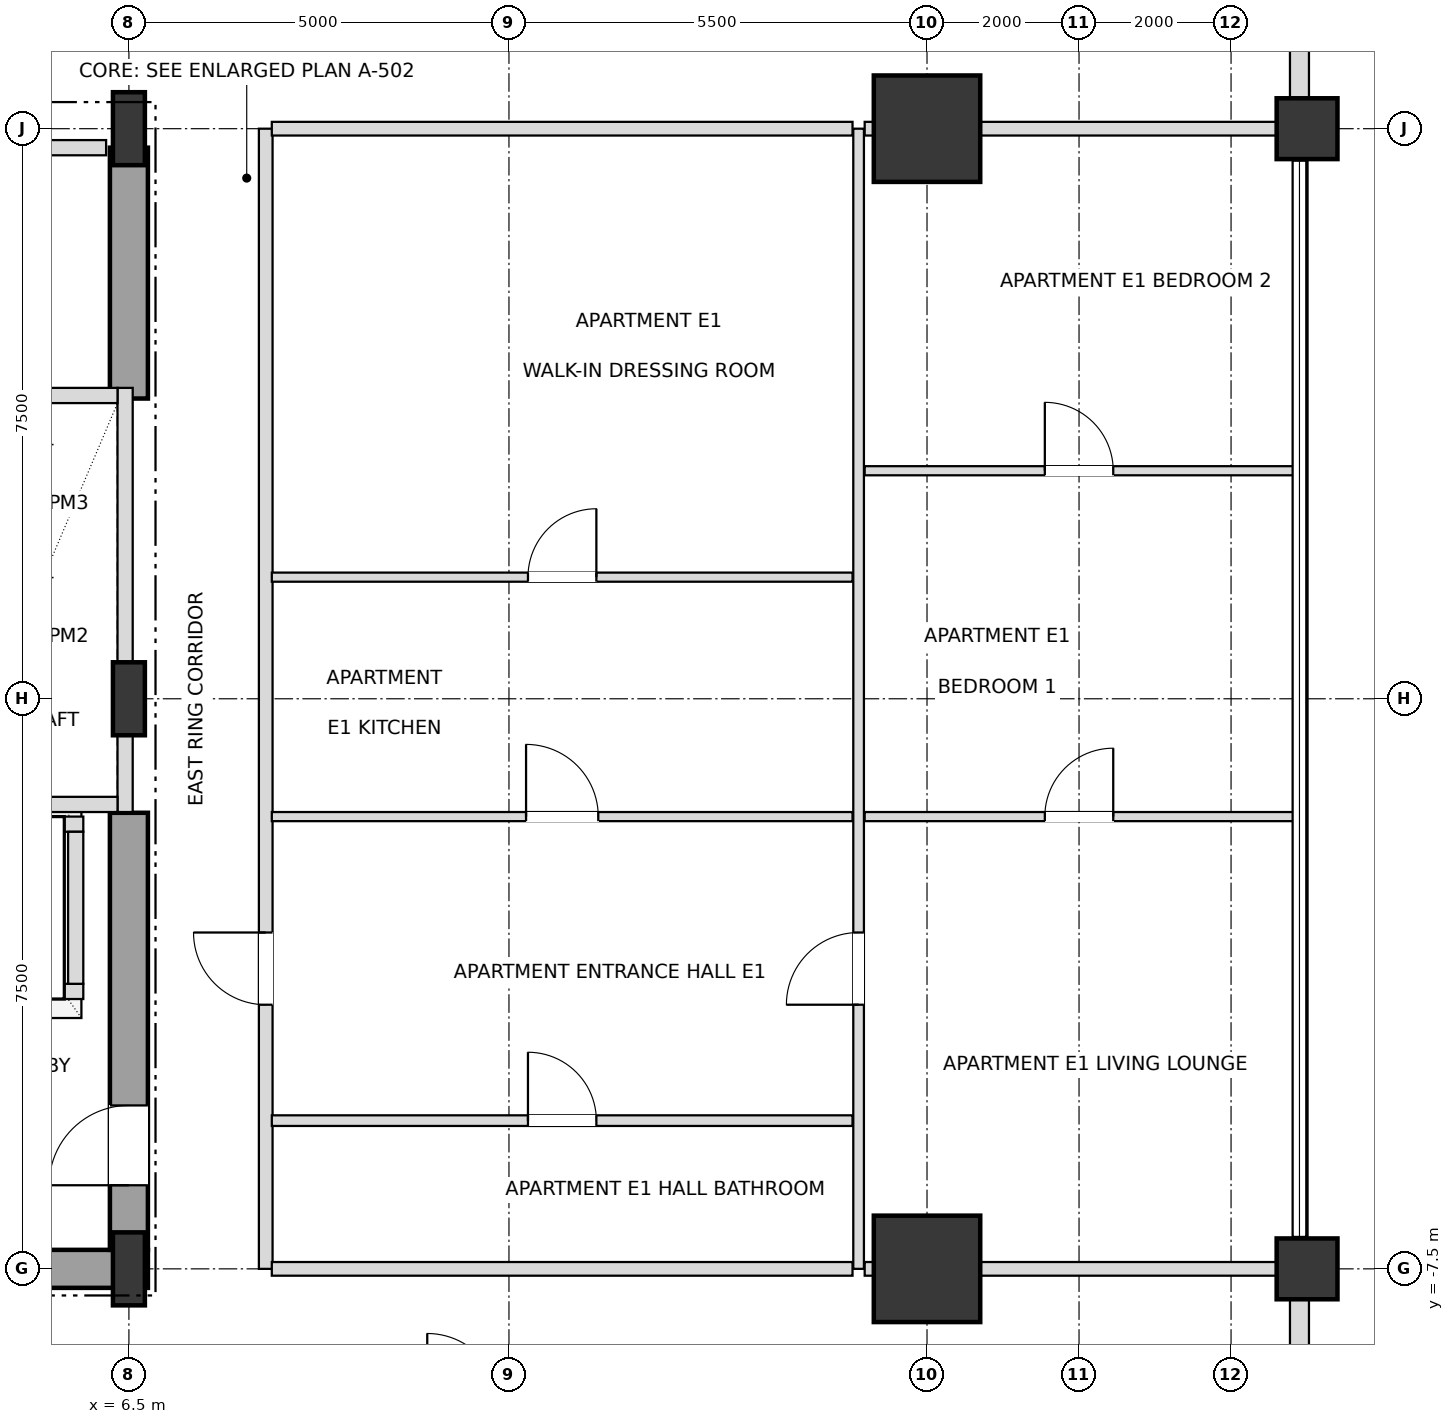
"""IFC4 building model, lengths in metres.
Left out: names, types, materials, properties, quantities, classifications, styles, units other than length and angle.
Written with IfcOpenShell. Run it as: python <this file> out.ifc"""

import sys

from ifc_helpers import new_model, si_unit, direction, frame, frame_2d, origin, origin_2d, place, context, subcontext, project, spatial, rectangle, i_section, extrude, element, fill, save


model = new_model("IFC4")
c1 = context("Model", 3, precision=1e-05, world=origin(), true_north=direction((0.0, 1.0)))
c2 = subcontext(c1, "Body", "Model", "MODEL_VIEW")
j1 = project(units=[si_unit("LENGTHUNIT", "METRE"), si_unit("PLANEANGLEUNIT", "RADIAN")], contexts=[c1])
p1 = place(None, origin())
s1 = spatial("IfcSite", under=j1, at=p1, CompositionType="ELEMENT")
p2 = place(p1, origin())
s2 = spatial("IfcBuilding", under=s1, at=p2, CompositionType="ELEMENT")
p3 = place(p2, frame((0.0, 0.0, 64.8)))
s3 = spatial("IfcBuildingStorey", under=s2, at=p3, CompositionType="ELEMENT", Elevation=64.8)
for number, where, z_axis, x_axis in (
    (1, (6.5, -7.5, 0.0), (0.0, 0.0, 1.0), (1.0, 0.0, 0.0)),
    (2, (6.5, 0.0, 0.0), (0.0, 0.0, 1.0), (1.0, 0.0, 0.0)),
    (3, (6.5, 7.5, 0.0), (0.0, 0.0, 1.0), (1.0, 0.0, 0.0)),
):
    element("IfcColumn", number, at=place(p3, frame(where, z_axis=z_axis, x_axis=x_axis)), inside=s3, PredefinedType="COLUMN", context=c2, shape_type="SweptSolid", body=[
        extrude(i_section(OverallWidth=0.42, OverallDepth=0.96, WebThickness=0.022, FlangeThickness=0.034, at=origin_2d()), origin(), (0.0, 0.0, 1.0), 3.6),
    ])
for number, where, z_axis, x_axis in (
    (4, (17.0, -7.5, 0.0), (0.0, 0.0, 1.0), (1.0, 0.0, 0.0)),
    (5, (17.0, 7.5, 0.0), (0.0, 0.0, 1.0), (1.0, 0.0, 0.0)),
):
    element("IfcColumn", number, at=place(p3, frame(where, z_axis=z_axis, x_axis=x_axis)), inside=s3, PredefinedType="USERDEFINED", context=c2, shape_type="SweptSolid", body=[
        extrude(rectangle(XDim=1.4, YDim=1.4, at=origin_2d()), origin(), (0.0, 0.0, 1.0), 3.6),
    ])
for number, where, z_axis, x_axis in (
    (6, (22.0, -7.5, 0.0), (0.0, 0.0, 1.0), (1.0, 0.0, 0.0)),
    (7, (22.0, 7.5, 0.0), (0.0, 0.0, 1.0), (1.0, 0.0, 0.0)),
):
    element("IfcColumn", number, at=place(p3, frame(where, z_axis=z_axis, x_axis=x_axis)), inside=s3, PredefinedType="COLUMN", context=c2, shape_type="SweptSolid", body=[
        extrude(rectangle(XDim=0.8, YDim=0.8, at=origin_2d()), origin(), (0.0, 0.0, 1.0), 3.6),
    ])
p4 = place(p3, frame((21.9, -12.605, 0.0), z_axis=(0.0, 0.0, 1.0), x_axis=(0.0, 1.0, 0.0)))
e8 = element("IfcWall", 8, at=p4, inside=s3, PredefinedType="SOLIDWALL", context=c2, shape_type="SweptSolid", body=[
    extrude(rectangle(XDim=4.71, YDim=0.25, at=frame_2d((2.355, 0.0))), origin(), (0.0, 0.0, 1.0), 2.736),
])
p5 = place(p4, frame((1.455, 0.0, 0.72)))
e9 = element("IfcOpeningElement", 9, at=p5, cuts=e8, PredefinedType="OPENING", context=c2, shape_type="SweptSolid", body=[
    extrude(rectangle(XDim=1.8, YDim=1.68, at=frame_2d((0.9, 0.84))), frame((0.0, 0.135, 0.0), z_axis=(0.0, -1.0, 0.0), x_axis=(1.0, 0.0, 0.0)), (0.0, 0.0, 1.0), 0.27),
])
p6 = place(p3, frame((21.9, 7.895, 0.0), z_axis=(0.0, 0.0, 1.0), x_axis=(0.0, 1.0, 0.0)))
e10 = element("IfcWall", 10, at=p6, inside=s3, PredefinedType="SOLIDWALL", context=c2, shape_type="SweptSolid", body=[
    extrude(rectangle(XDim=4.71, YDim=0.25, at=frame_2d((2.355, 0.0))), origin(), (0.0, 0.0, 1.0), 2.736),
])
p7 = place(p6, frame((1.455, 0.0, 0.72)))
e11 = element("IfcOpeningElement", 11, at=p7, cuts=e10, PredefinedType="OPENING", context=c2, shape_type="SweptSolid", body=[
    extrude(rectangle(XDim=1.8, YDim=1.68, at=frame_2d((0.9, 0.84))), frame((0.0, 0.135, 0.0), z_axis=(0.0, -1.0, 0.0), x_axis=(1.0, 0.0, 0.0)), (0.0, 0.0, 1.0), 0.27),
])
p8 = place(p3, frame((0.0, -7.5, 0.0), z_axis=(0.0, 0.0, 1.0), x_axis=(1.0, 0.0, 0.0)))
e12 = element("IfcWall", 12, at=p8, inside=s3, PredefinedType="SHEAR", context=c2, shape_type="SweptSolid", body=[
    extrude(rectangle(XDim=6.75, YDim=0.5, at=frame_2d((3.375, 0.0))), origin(), (0.0, 0.0, 1.0), 3.38),
])
p9 = place(p3, frame((6.5, -7.25, 0.0), z_axis=(0.0, 0.0, 1.0), x_axis=(0.0, 1.0, 0.0)))
e13 = element("IfcWall", 13, at=p9, inside=s3, PredefinedType="SHEAR", context=c2, shape_type="SweptSolid", body=[
    extrude(rectangle(XDim=5.75, YDim=0.5, at=frame_2d((2.875, 0.0))), origin(), (0.0, 0.0, 1.0), 3.38),
])
p10 = place(p9, frame((0.85, 0.0, 0.0)))
e14 = element("IfcOpeningElement", 14, at=p10, cuts=e13, PredefinedType="OPENING", context=c2, shape_type="SweptSolid", body=[
    extrude(rectangle(XDim=1.05, YDim=2.15, at=frame_2d((0.525, 1.075))), frame((0.0, 0.26, 0.0), z_axis=(0.0, -1.0, 0.0), x_axis=(1.0, 0.0, 0.0)), (0.0, 0.0, 1.0), 0.52),
])
p11 = place(p3, frame((6.5, 3.95, 0.0), z_axis=(0.0, 0.0, 1.0), x_axis=(0.0, 1.0, 0.0)))
e15 = element("IfcWall", 15, at=p11, inside=s3, PredefinedType="SHEAR", context=c2, shape_type="SweptSolid", body=[
    extrude(rectangle(XDim=3.3, YDim=0.5, at=frame_2d((1.65, 0.0))), origin(), (0.0, 0.0, 1.0), 3.38),
])
p12 = place(p3, frame((6.45, -1.49, 0.0), z_axis=(0.0, 0.0, 1.0), x_axis=(0.0, 1.0, 0.0)))
e16 = element("IfcWall", 16, at=p12, inside=s3, PredefinedType="SOLIDWALL", context=c2, shape_type="SweptSolid", body=[
    extrude(rectangle(XDim=5.58, YDim=0.2, at=frame_2d((2.79, 0.0))), origin(), (0.0, 0.0, 1.0), 2.816),
])
for number, where, z_axis, x_axis in (
    (17, (4.15, -1.39, 0.0), (0.0, 0.0, 1.0), (1.0, 0.0, 0.0)),
    (18, (4.15, 3.99, 0.0), (0.0, 0.0, 1.0), (1.0, 0.0, 0.0)),
):
    element("IfcWall", number, at=place(p3, frame(where, z_axis=z_axis, x_axis=x_axis)), inside=s3, PredefinedType="SOLIDWALL", context=c2, shape_type="SweptSolid", body=[
        extrude(rectangle(XDim=2.2, YDim=0.2, at=frame_2d((1.1, 0.0))), origin(), (0.0, 0.0, 1.0), 3.38),
    ])
p13 = place(p3, frame((1.8, -3.85, 0.0), z_axis=(0.0, 0.0, 1.0), x_axis=(1.0, 0.0, 0.0)))
e19 = element("IfcWall", 19, at=p13, inside=s3, PredefinedType="SOLIDWALL", context=c2, shape_type="SweptSolid", body=[
    extrude(rectangle(XDim=4.1, YDim=0.2, at=frame_2d((2.05, 0.0))), origin(), (0.0, 0.0, 1.0), 3.38),
])
p14 = place(p13, frame((0.45, 0.0, 0.0)))
e20 = element("IfcOpeningElement", 20, at=p14, cuts=e19, PredefinedType="OPENING", context=c2, shape_type="SweptSolid", body=[
    extrude(rectangle(XDim=1.2, YDim=2.2, at=frame_2d((0.6, 1.1))), frame((0.0, 0.11, 0.0), z_axis=(0.0, -1.0, 0.0), x_axis=(1.0, 0.0, 0.0)), (0.0, 0.0, 1.0), 0.22),
])
p15 = place(p13, frame((2.45, 0.0, 0.0)))
e21 = element("IfcOpeningElement", 21, at=p15, cuts=e19, PredefinedType="OPENING", context=c2, shape_type="SweptSolid", body=[
    extrude(rectangle(XDim=1.2, YDim=2.2, at=frame_2d((0.6, 1.1))), frame((0.0, 0.11, 0.0), z_axis=(0.0, -1.0, 0.0), x_axis=(1.0, 0.0, 0.0)), (0.0, 0.0, 1.0), 0.22),
])
p16 = place(p3, frame((1.8, -1.65, 0.0), z_axis=(0.0, 0.0, 1.0), x_axis=(1.0, 0.0, 0.0)))
e22 = element("IfcWall", 22, at=p16, inside=s3, PredefinedType="SOLIDWALL", context=c2, shape_type="SweptSolid", body=[
    extrude(rectangle(XDim=4.1, YDim=0.2, at=frame_2d((2.05, 0.0))), origin(), (0.0, 0.0, 1.0), 3.38),
])
p17 = place(p3, frame((5.8, -3.75, 0.0), z_axis=(0.0, 0.0, 1.0), x_axis=(0.0, 1.0, 0.0)))
e23 = element("IfcWall", 23, at=p17, inside=s3, PredefinedType="SOLIDWALL", context=c2, shape_type="SweptSolid", body=[
    extrude(rectangle(XDim=2.0, YDim=0.2, at=frame_2d((1.0, 0.0))), origin(), (0.0, 0.0, 1.0), 3.38),
])
p18 = place(p3, frame((8.3, -7.5, 0.0), z_axis=(0.0, 0.0, 1.0), x_axis=(0.0, 1.0, 0.0)))
e24 = element("IfcWall", 24, at=p18, inside=s3, PredefinedType="PARTITIONING", context=c2, shape_type="SweptSolid", body=[
    extrude(rectangle(XDim=15.0, YDim=0.18, at=frame_2d((7.5, 0.0))), origin(), (0.0, 0.0, 1.0), 3.38),
])
p19 = place(p18, frame((3.475, 0.0, 0.0)))
e25 = element("IfcOpeningElement", 25, at=p19, cuts=e24, PredefinedType="OPENING", context=c2, shape_type="SweptSolid", body=[
    extrude(rectangle(XDim=0.95, YDim=2.15, at=frame_2d((0.475, 1.075))), frame((0.0, 0.1, 0.0), z_axis=(0.0, -1.0, 0.0), x_axis=(1.0, 0.0, 0.0)), (0.0, 0.0, 1.0), 0.2),
])
p20 = place(p3, frame((16.1, -7.5, 0.0), z_axis=(0.0, 0.0, 1.0), x_axis=(0.0, 1.0, 0.0)))
e26 = element("IfcWall", 26, at=p20, inside=s3, PredefinedType="PARTITIONING", context=c2, shape_type="SweptSolid", body=[
    extrude(rectangle(XDim=15.0, YDim=0.14, at=frame_2d((7.5, 0.0))), origin(), (0.0, 0.0, 1.0), 3.38),
])
p21 = place(p20, frame((3.475, 0.0, 0.0)))
e27 = element("IfcOpeningElement", 27, at=p21, cuts=e26, PredefinedType="OPENING", context=c2, shape_type="SweptSolid", body=[
    extrude(rectangle(XDim=0.95, YDim=2.1, at=frame_2d((0.475, 1.05))), frame((0.0, 0.08, 0.0), z_axis=(0.0, -1.0, 0.0), x_axis=(1.0, 0.0, 0.0)), (0.0, 0.0, 1.0), 0.16),
])
p22 = place(p3, frame((8.38, -7.5, 0.0), z_axis=(0.0, 0.0, 1.0), x_axis=(1.0, 0.0, 0.0)))
e28 = element("IfcWall", 28, at=p22, inside=s3, PredefinedType="PARTITIONING", context=c2, shape_type="SweptSolid", body=[
    extrude(rectangle(XDim=7.64, YDim=0.18, at=frame_2d((3.82, 0.0))), origin(), (0.0, 0.0, 1.0), 2.816),
])
p23 = place(p3, frame((16.18, -7.5, 0.0), z_axis=(0.0, 0.0, 1.0), x_axis=(1.0, 0.0, 0.0)))
e29 = element("IfcWall", 29, at=p23, inside=s3, PredefinedType="PARTITIONING", context=c2, shape_type="SweptSolid", body=[
    extrude(rectangle(XDim=5.72, YDim=0.18, at=frame_2d((2.86, 0.0))), origin(), (0.0, 0.0, 1.0), 2.816),
])
p24 = place(p3, frame((8.38, -5.55, 0.0), z_axis=(0.0, 0.0, 1.0), x_axis=(1.0, 0.0, 0.0)))
e30 = element("IfcWall", 30, at=p24, inside=s3, PredefinedType="PARTITIONING", context=c2, shape_type="SweptSolid", body=[
    extrude(rectangle(XDim=7.64, YDim=0.14, at=frame_2d((3.82, 0.0))), origin(), (0.0, 0.0, 1.0), 2.948),
])
p25 = place(p24, frame((3.37, 0.0, 0.0)))
e31 = element("IfcOpeningElement", 31, at=p25, cuts=e30, PredefinedType="OPENING", context=c2, shape_type="SweptSolid", body=[
    extrude(rectangle(XDim=0.9, YDim=2.1, at=frame_2d((0.45, 1.05))), frame((0.0, 0.08, 0.0), z_axis=(0.0, -1.0, 0.0), x_axis=(1.0, 0.0, 0.0)), (0.0, 0.0, 1.0), 0.16),
])
p26 = place(p3, frame((8.38, -1.55, 0.0), z_axis=(0.0, 0.0, 1.0), x_axis=(1.0, 0.0, 0.0)))
e32 = element("IfcWall", 32, at=p26, inside=s3, PredefinedType="PARTITIONING", context=c2, shape_type="SweptSolid", body=[
    extrude(rectangle(XDim=7.64, YDim=0.12, at=frame_2d((3.82, 0.0))), origin(), (0.0, 0.0, 1.0), 2.948),
])
p27 = place(p26, frame((3.345, 0.0, 0.0)))
e33 = element("IfcOpeningElement", 33, at=p27, cuts=e32, PredefinedType="OPENING", context=c2, shape_type="SweptSolid", body=[
    extrude(rectangle(XDim=0.95, YDim=2.1, at=frame_2d((0.475, 1.05))), frame((0.0, 0.07, 0.0), z_axis=(0.0, -1.0, 0.0), x_axis=(1.0, 0.0, 0.0)), (0.0, 0.0, 1.0), 0.14),
])
p28 = place(p3, frame((16.18, -1.55, 0.0), z_axis=(0.0, 0.0, 1.0), x_axis=(1.0, 0.0, 0.0)))
e34 = element("IfcWall", 34, at=p28, inside=s3, PredefinedType="PARTITIONING", context=c2, shape_type="SweptSolid", body=[
    extrude(rectangle(XDim=5.64, YDim=0.12, at=frame_2d((2.82, 0.0))), origin(), (0.0, 0.0, 1.0), 2.816),
])
p29 = place(p28, frame((2.37, 0.0, 0.0)))
e35 = element("IfcOpeningElement", 35, at=p29, cuts=e34, PredefinedType="OPENING", context=c2, shape_type="SweptSolid", body=[
    extrude(rectangle(XDim=0.9, YDim=2.1, at=frame_2d((0.45, 1.05))), frame((0.0, 0.07, 0.0), z_axis=(0.0, -1.0, 0.0), x_axis=(1.0, 0.0, 0.0)), (0.0, 0.0, 1.0), 0.14),
])
p30 = place(p3, frame((8.38, 1.6, 0.0), z_axis=(0.0, 0.0, 1.0), x_axis=(1.0, 0.0, 0.0)))
e36 = element("IfcWall", 36, at=p30, inside=s3, PredefinedType="PARTITIONING", context=c2, shape_type="SweptSolid", body=[
    extrude(rectangle(XDim=7.64, YDim=0.12, at=frame_2d((3.82, 0.0))), origin(), (0.0, 0.0, 1.0), 2.948),
])
p31 = place(p30, frame((3.37, 0.0, 0.0)))
e37 = element("IfcOpeningElement", 37, at=p31, cuts=e36, PredefinedType="OPENING", context=c2, shape_type="SweptSolid", body=[
    extrude(rectangle(XDim=0.9, YDim=2.1, at=frame_2d((0.45, 1.05))), frame((0.0, 0.07, 0.0), z_axis=(0.0, -1.0, 0.0), x_axis=(1.0, 0.0, 0.0)), (0.0, 0.0, 1.0), 0.14),
])
p32 = place(p3, frame((16.18, 3.0, 0.0), z_axis=(0.0, 0.0, 1.0), x_axis=(1.0, 0.0, 0.0)))
e38 = element("IfcWall", 38, at=p32, inside=s3, PredefinedType="PARTITIONING", context=c2, shape_type="SweptSolid", body=[
    extrude(rectangle(XDim=5.64, YDim=0.12, at=frame_2d((2.82, 0.0))), origin(), (0.0, 0.0, 1.0), 2.816),
])
p33 = place(p32, frame((2.37, 0.0, 0.0)))
e39 = element("IfcOpeningElement", 39, at=p33, cuts=e38, PredefinedType="OPENING", context=c2, shape_type="SweptSolid", body=[
    extrude(rectangle(XDim=0.9, YDim=2.1, at=frame_2d((0.45, 1.05))), frame((0.0, 0.07, 0.0), z_axis=(0.0, -1.0, 0.0), x_axis=(1.0, 0.0, 0.0)), (0.0, 0.0, 1.0), 0.14),
])
p34 = place(p3, frame((4.13, 7.25, 0.0), z_axis=(0.0, 0.0, 1.0), x_axis=(1.0, 0.0, 0.0)))
e40 = element("IfcWall", 40, at=p34, inside=s3, PredefinedType="SOLIDWALL", context=c2, shape_type="SweptSolid", body=[
    extrude(rectangle(XDim=2.07, YDim=0.2, at=frame_2d((1.035, 0.0))), origin(), (0.0, 0.0, 1.0), 3.38),
])
p35 = place(p3, frame((8.38, 7.5, 0.0), z_axis=(0.0, 0.0, 1.0), x_axis=(1.0, 0.0, 0.0)))
e41 = element("IfcWall", 41, at=p35, inside=s3, PredefinedType="PARTITIONING", context=c2, shape_type="SweptSolid", body=[
    extrude(rectangle(XDim=7.64, YDim=0.18, at=frame_2d((3.82, 0.0))), origin(), (0.0, 0.0, 1.0), 2.816),
])
p36 = place(p3, frame((16.18, 7.5, 0.0), z_axis=(0.0, 0.0, 1.0), x_axis=(1.0, 0.0, 0.0)))
e42 = element("IfcWall", 42, at=p36, inside=s3, PredefinedType="PARTITIONING", context=c2, shape_type="SweptSolid", body=[
    extrude(rectangle(XDim=5.72, YDim=0.18, at=frame_2d((2.86, 0.0))), origin(), (0.0, 0.0, 1.0), 2.816),
])
p37 = place(p10, origin())
e43 = element("IfcDoor", 43, at=p37, inside=s3, OperationType="SINGLE_SWING_LEFT", PredefinedType="DOOR", context=c2, shape_type="SweptSolid", body=[
    extrude(rectangle(XDim=1.05, YDim=2.15, at=frame_2d((0.525, 1.075))), frame((0.0, 0.025, 0.0), z_axis=(0.0, -1.0, 0.0), x_axis=(1.0, 0.0, 0.0)), (0.0, 0.0, 1.0), 0.05),
])
fill(e14, e43)
p38 = place(p25, origin())
e44 = element("IfcDoor", 44, at=p38, inside=s3, OperationType="SINGLE_SWING_LEFT", PredefinedType="DOOR", context=c2, shape_type="SweptSolid", body=[
    extrude(rectangle(XDim=0.9, YDim=2.1, at=frame_2d((0.45, 1.05))), frame((0.0, 0.025, 0.0), z_axis=(0.0, -1.0, 0.0), x_axis=(1.0, 0.0, 0.0)), (0.0, 0.0, 1.0), 0.05),
])
fill(e31, e44)
p39 = place(p19, origin())
e45 = element("IfcDoor", 45, at=p39, inside=s3, OperationType="SINGLE_SWING_RIGHT", PredefinedType="DOOR", context=c2, shape_type="SweptSolid", body=[
    extrude(rectangle(XDim=0.95, YDim=2.15, at=frame_2d((0.475, 1.075))), frame((0.0, 0.025, 0.0), z_axis=(0.0, -1.0, 0.0), x_axis=(1.0, 0.0, 0.0)), (0.0, 0.0, 1.0), 0.05),
])
fill(e25, e45)
p40 = place(p27, origin())
e46 = element("IfcDoor", 46, at=p40, inside=s3, OperationType="SINGLE_SWING_LEFT", PredefinedType="DOOR", context=c2, shape_type="SweptSolid", body=[
    extrude(rectangle(XDim=0.95, YDim=2.1, at=frame_2d((0.475, 1.05))), frame((0.0, 0.025, 0.0), z_axis=(0.0, -1.0, 0.0), x_axis=(1.0, 0.0, 0.0)), (0.0, 0.0, 1.0), 0.05),
])
fill(e33, e46)
p41 = place(p31, origin())
e47 = element("IfcDoor", 47, at=p41, inside=s3, OperationType="SINGLE_SWING_RIGHT", PredefinedType="DOOR", context=c2, shape_type="SweptSolid", body=[
    extrude(rectangle(XDim=0.9, YDim=2.1, at=frame_2d((0.45, 1.05))), frame((0.0, 0.025, 0.0), z_axis=(0.0, -1.0, 0.0), x_axis=(1.0, 0.0, 0.0)), (0.0, 0.0, 1.0), 0.05),
])
fill(e37, e47)
p42 = place(p21, origin())
e48 = element("IfcDoor", 48, at=p42, inside=s3, OperationType="SINGLE_SWING_LEFT", PredefinedType="DOOR", context=c2, shape_type="SweptSolid", body=[
    extrude(rectangle(XDim=0.95, YDim=2.1, at=frame_2d((0.475, 1.05))), frame((0.0, 0.025, 0.0), z_axis=(0.0, -1.0, 0.0), x_axis=(1.0, 0.0, 0.0)), (0.0, 0.0, 1.0), 0.05),
])
fill(e27, e48)
p43 = place(p29, origin())
e49 = element("IfcDoor", 49, at=p43, inside=s3, OperationType="SINGLE_SWING_RIGHT", PredefinedType="DOOR", context=c2, shape_type="SweptSolid", body=[
    extrude(rectangle(XDim=0.9, YDim=2.1, at=frame_2d((0.45, 1.05))), frame((0.0, 0.025, 0.0), z_axis=(0.0, -1.0, 0.0), x_axis=(1.0, 0.0, 0.0)), (0.0, 0.0, 1.0), 0.05),
])
fill(e35, e49)
p44 = place(p33, origin())
e50 = element("IfcDoor", 50, at=p44, inside=s3, OperationType="SINGLE_SWING_LEFT", PredefinedType="DOOR", context=c2, shape_type="SweptSolid", body=[
    extrude(rectangle(XDim=0.9, YDim=2.1, at=frame_2d((0.45, 1.05))), frame((0.0, 0.025, 0.0), z_axis=(0.0, -1.0, 0.0), x_axis=(1.0, 0.0, 0.0)), (0.0, 0.0, 1.0), 0.05),
])
fill(e39, e50)
save(model, sys.argv[1])
